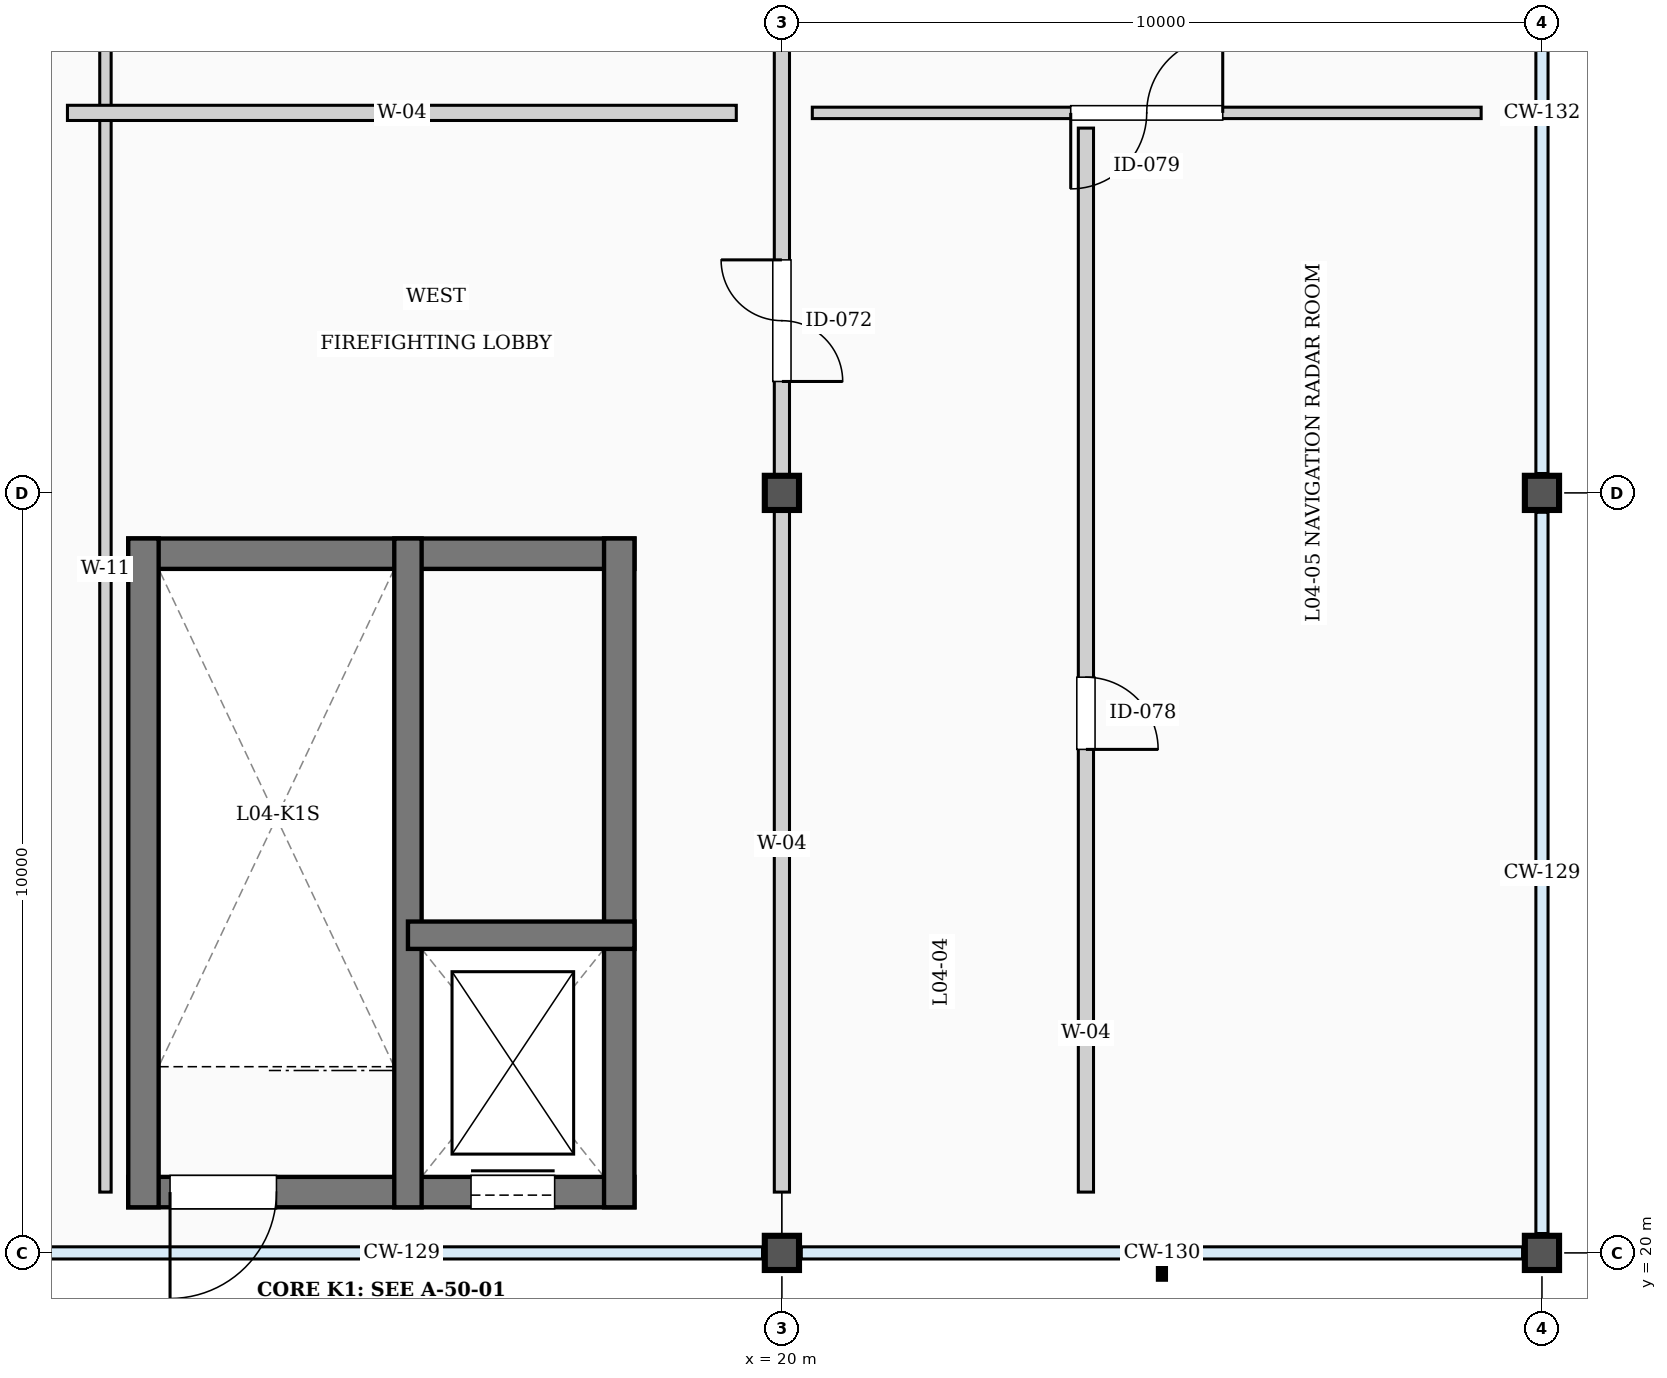
"""IFC4 building model, lengths in metres.
Left out: names, types, materials, properties, quantities, classifications, styles, units other than length and angle.
Written with IfcOpenShell. Run it as: python <this file> out.ifc"""

import sys

from ifc_helpers import new_model, si_unit, direction, frame, frame_2d, origin, origin_2d, place, context, subcontext, project, spatial, rectangle, extrude, element, fill, save


model = new_model("IFC4")
c1 = context("Model", 3, precision=1e-05, world=origin(), true_north=direction((0.0, 1.0)))
c2 = subcontext(c1, "Body", "Model", "MODEL_VIEW")
j1 = project(units=[si_unit("LENGTHUNIT", "METRE"), si_unit("PLANEANGLEUNIT", "RADIAN")], contexts=[c1])
p1 = place(None, origin())
s1 = spatial("IfcSite", under=j1, at=p1, CompositionType="ELEMENT")
p2 = place(p1, origin())
s2 = spatial("IfcBuilding", under=s1, at=p2, CompositionType="ELEMENT")
p3 = place(p2, frame((0.0, 0.0, 18.3)))
s3 = spatial("IfcBuildingStorey", under=s2, at=p3, CompositionType="ELEMENT", Elevation=18.3)
for number, where, z_axis, x_axis in (
    (1, (20.0, 20.0, 0.0), (0.0, 0.0, 1.0), (1.0, 0.0, 0.0)),
    (2, (20.0, 30.0, 0.0), (0.0, 0.0, 1.0), (1.0, 0.0, 0.0)),
    (3, (30.0, 20.0, 0.0), (0.0, 0.0, 1.0), (1.0, 0.0, 0.0)),
    (4, (30.0, 30.0, 0.0), (0.0, 0.0, 1.0), (1.0, 0.0, 0.0)),
):
    element("IfcColumn", number, at=place(p3, frame(where, z_axis=z_axis, x_axis=x_axis)), inside=s3, PredefinedType="COLUMN", context=c2, shape_type="SweptSolid", body=[
        extrude(rectangle(XDim=0.45, YDim=0.45, at=origin_2d()), origin(), (0.0, 0.0, 1.0), 3.9),
    ])
p4 = place(p3, frame((11.4, 20.8, 0.0), z_axis=(0.0, 0.0, 1.0), x_axis=(1.0, 0.0, 0.0)))
e5 = element("IfcWall", 5, at=p4, inside=s3, PredefinedType="SHEAR", context=c2, shape_type="SweptSolid", body=[
    extrude(rectangle(XDim=6.66, YDim=0.4, at=frame_2d((3.33, 0.0))), origin(), (0.0, 0.0, 1.0), 3.9),
])
p5 = place(p4, frame((0.55, 0.0, 0.0)))
e6 = element("IfcOpeningElement", 6, at=p5, cuts=e5, PredefinedType="OPENING", context=c2, shape_type="SweptSolid", body=[
    extrude(rectangle(XDim=1.4, YDim=2.35, at=frame_2d((0.7, 1.175))), frame((0.0, 0.21, 0.0), z_axis=(0.0, -1.0, 0.0), x_axis=(1.0, 0.0, 0.0)), (0.0, 0.0, 1.0), 0.42),
])
p6 = place(p4, frame((4.51, 0.0, 0.0)))
e7 = element("IfcOpeningElement", 7, at=p6, cuts=e5, PredefinedType="OPENING", context=c2, shape_type="SweptSolid", body=[
    extrude(rectangle(XDim=1.1, YDim=2.3, at=frame_2d((0.55, 1.15))), frame((0.0, 0.21, 0.0), z_axis=(0.0, -1.0, 0.0), x_axis=(1.0, 0.0, 0.0)), (0.0, 0.0, 1.0), 0.42),
])
p7 = place(p3, frame((11.4, 29.2, 0.0), z_axis=(0.0, 0.0, 1.0), x_axis=(1.0, 0.0, 0.0)))
e8 = element("IfcWall", 8, at=p7, inside=s3, PredefinedType="SHEAR", context=c2, shape_type="SweptSolid", body=[
    extrude(rectangle(XDim=6.66, YDim=0.4, at=frame_2d((3.33, 0.0))), origin(), (0.0, 0.0, 1.0), 3.9),
])
for number, where, z_axis, x_axis in (
    (9, (11.6, 20.6, 0.0), (0.0, 0.0, 1.0), (0.0, 1.0, 0.0)),
    (10, (17.86, 20.6, 0.0), (0.0, 0.0, 1.0), (0.0, 1.0, 0.0)),
):
    element("IfcWall", number, at=place(p3, frame(where, z_axis=z_axis, x_axis=x_axis)), inside=s3, PredefinedType="SHEAR", context=c2, shape_type="SweptSolid", body=[
        extrude(rectangle(XDim=8.8, YDim=0.4, at=frame_2d((4.4, 0.0))), origin(), (0.0, 0.0, 1.0), 3.9),
    ])
p8 = place(p3, frame((15.08, 20.6, 0.0), z_axis=(0.0, 0.0, 1.0), x_axis=(0.0, 1.0, 0.0)))
e11 = element("IfcWall", 11, at=p8, inside=s3, PredefinedType="SHEAR", context=c2, shape_type="SweptSolid", body=[
    extrude(rectangle(XDim=8.8, YDim=0.36, at=frame_2d((4.4, 0.0))), origin(), (0.0, 0.0, 1.0), 3.9),
])
p9 = place(p3, frame((15.08, 24.18, 0.0), z_axis=(0.0, 0.0, 1.0), x_axis=(1.0, 0.0, 0.0)))
e12 = element("IfcWall", 12, at=p9, inside=s3, PredefinedType="SHEAR", context=c2, shape_type="SweptSolid", body=[
    extrude(rectangle(XDim=2.98, YDim=0.36, at=frame_2d((1.49, 0.0))), origin(), (0.0, 0.0, 1.0), 3.9),
])
p10 = place(p3, frame((20.0, 20.8, 0.0), z_axis=(0.0, 0.0, 1.0), x_axis=(0.0, 1.0, 0.0)))
e13 = element("IfcWall", 13, at=p10, inside=s3, PredefinedType="PARTITIONING", context=c2, shape_type="SweptSolid", body=[
    extrude(rectangle(XDim=29.4, YDim=0.2, at=frame_2d((14.7, 0.0))), origin(), (0.0, 0.0, 1.0), 3.51),
])
p11 = place(p10, frame((10.666, 0.0, 0.0)))
e14 = element("IfcOpeningElement", 14, at=p11, cuts=e13, PredefinedType="OPENING", context=c2, shape_type="SweptSolid", body=[
    extrude(rectangle(XDim=1.6, YDim=2.4, at=frame_2d((0.8, 1.2))), frame((0.0, 0.11, 0.0), z_axis=(0.0, -1.0, 0.0), x_axis=(1.0, 0.0, 0.0)), (0.0, 0.0, 1.0), 0.22),
])
p12 = place(p10, frame((15.939, 0.0, 0.0)))
e15 = element("IfcOpeningElement", 15, at=p12, cuts=e13, PredefinedType="OPENING", context=c2, shape_type="SweptSolid", body=[
    extrude(rectangle(XDim=1.05, YDim=2.45, at=frame_2d((0.525, 1.225))), frame((0.0, 0.11, 0.0), z_axis=(0.0, -1.0, 0.0), x_axis=(1.0, 0.0, 0.0)), (0.0, 0.0, 1.0), 0.22),
])
p13 = place(p3, frame((11.1, 20.8, 0.0), z_axis=(0.0, 0.0, 1.0), x_axis=(0.0, 1.0, 0.0)))
e16 = element("IfcWall", 16, at=p13, inside=s3, PredefinedType="PARTITIONING", context=c2, shape_type="SweptSolid", body=[
    extrude(rectangle(XDim=38.4, YDim=0.15, at=frame_2d((19.2, 0.0))), origin(), (0.0, 0.0, 1.0), 3.56),
])
p14 = place(p13, frame((16.321, 0.0, 0.0)))
e17 = element("IfcOpeningElement", 17, at=p14, cuts=e16, PredefinedType="OPENING", context=c2, shape_type="SweptSolid", body=[
    extrude(rectangle(XDim=1.15, YDim=2.35, at=frame_2d((0.575, 1.175))), frame((0.0, 0.085, 0.0), z_axis=(0.0, -1.0, 0.0), x_axis=(1.0, 0.0, 0.0)), (0.0, 0.0, 1.0), 0.17),
])
p15 = place(p13, frame((25.746, 0.0, 0.0)))
e18 = element("IfcOpeningElement", 18, at=p15, cuts=e16, PredefinedType="OPENING", context=c2, shape_type="SweptSolid", body=[
    extrude(rectangle(XDim=1.5, YDim=2.5, at=frame_2d((0.75, 1.25))), frame((0.0, 0.085, 0.0), z_axis=(0.0, -1.0, 0.0), x_axis=(1.0, 0.0, 0.0)), (0.0, 0.0, 1.0), 0.17),
])
p16 = place(p3, frame((10.6, 35.0, 0.0), z_axis=(0.0, 0.0, 1.0), x_axis=(1.0, 0.0, 0.0)))
e19 = element("IfcWall", 19, at=p16, inside=s3, PredefinedType="PARTITIONING", context=c2, shape_type="SweptSolid", body=[
    extrude(rectangle(XDim=8.8, YDim=0.2, at=frame_2d((4.4, 0.0))), origin(), (0.0, 0.0, 1.0), 3.56),
])
p17 = place(p3, frame((24.0, 20.8, 0.0), z_axis=(0.0, 0.0, 1.0), x_axis=(0.0, 1.0, 0.0)))
e20 = element("IfcWall", 20, at=p17, inside=s3, PredefinedType="PARTITIONING", context=c2, shape_type="SweptSolid", body=[
    extrude(rectangle(XDim=14.0, YDim=0.2, at=frame_2d((7.0, 0.0))), origin(), (0.0, 0.0, 1.0), 3.56),
])
p18 = place(p17, frame((5.825, 0.0, 0.0)))
e21 = element("IfcOpeningElement", 21, at=p18, cuts=e20, PredefinedType="OPENING", context=c2, shape_type="SweptSolid", body=[
    extrude(rectangle(XDim=0.95, YDim=2.3, at=frame_2d((0.475, 1.15))), frame((0.0, 0.11, 0.0), z_axis=(0.0, -1.0, 0.0), x_axis=(1.0, 0.0, 0.0)), (0.0, 0.0, 1.0), 0.22),
])
p19 = place(p3, frame((20.4, 35.0, 0.0), z_axis=(0.0, 0.0, 1.0), x_axis=(1.0, 0.0, 0.0)))
e22 = element("IfcWall", 22, at=p19, inside=s3, PredefinedType="PARTITIONING", context=c2, shape_type="SweptSolid", body=[
    extrude(rectangle(XDim=8.8, YDim=0.15, at=frame_2d((4.4, 0.0))), origin(), (0.0, 0.0, 1.0), 3.56),
])
p20 = place(p19, frame((3.4, 0.0, 0.0)))
e23 = element("IfcOpeningElement", 23, at=p20, cuts=e22, PredefinedType="OPENING", context=c2, shape_type="SweptSolid", body=[
    extrude(rectangle(XDim=2.0, YDim=2.45, at=frame_2d((1.0, 1.225))), frame((0.0, 0.085, 0.0), z_axis=(0.0, -1.0, 0.0), x_axis=(1.0, 0.0, 0.0)), (0.0, 0.0, 1.0), 0.17),
])
p21 = place(p5, origin())
e24 = element("IfcDoor", 24, at=p21, inside=s3, OperationType="SINGLE_SWING_LEFT", PredefinedType="DOOR", context=c2, shape_type="SweptSolid", body=[
    extrude(rectangle(XDim=1.4, YDim=2.35, at=frame_2d((0.7, 1.175))), frame((0.0, 0.025, 0.0), z_axis=(0.0, -1.0, 0.0), x_axis=(1.0, 0.0, 0.0)), (0.0, 0.0, 1.0), 0.05),
])
fill(e6, e24)
p22 = place(p6, origin())
e25 = element("IfcDoor", 25, at=p22, inside=s3, OperationType="SLIDING_TO_LEFT", PredefinedType="DOOR", context=c2, shape_type="SweptSolid", body=[
    extrude(rectangle(XDim=1.1, YDim=2.3, at=frame_2d((0.55, 1.15))), frame((0.0, 0.025, 0.0), z_axis=(0.0, -1.0, 0.0), x_axis=(1.0, 0.0, 0.0)), (0.0, 0.0, 1.0), 0.05),
])
fill(e7, e25)
p23 = place(p11, origin())
e26 = element("IfcDoor", 26, at=p23, inside=s3, OperationType="DOUBLE_DOOR_SINGLE_SWING", PredefinedType="DOOR", context=c2, shape_type="SweptSolid", body=[
    extrude(rectangle(XDim=1.6, YDim=2.4, at=frame_2d((0.8, 1.2))), frame((0.0, 0.025, 0.0), z_axis=(0.0, -1.0, 0.0), x_axis=(1.0, 0.0, 0.0)), (0.0, 0.0, 1.0), 0.05),
])
fill(e14, e26)
p24 = place(p18, origin())
e27 = element("IfcDoor", 27, at=p24, inside=s3, OperationType="SINGLE_SWING_LEFT", PredefinedType="DOOR", context=c2, shape_type="SweptSolid", body=[
    extrude(rectangle(XDim=0.95, YDim=2.3, at=frame_2d((0.475, 1.15))), frame((0.0, 0.025, 0.0), z_axis=(0.0, -1.0, 0.0), x_axis=(1.0, 0.0, 0.0)), (0.0, 0.0, 1.0), 0.05),
])
fill(e21, e27)
p25 = place(p20, origin())
e28 = element("IfcDoor", 28, at=p25, inside=s3, OperationType="DOUBLE_DOOR_SINGLE_SWING", PredefinedType="DOOR", context=c2, shape_type="SweptSolid", body=[
    extrude(rectangle(XDim=2.0, YDim=2.45, at=frame_2d((1.0, 1.225))), frame((0.0, 0.025, 0.0), z_axis=(0.0, -1.0, 0.0), x_axis=(1.0, 0.0, 0.0)), (0.0, 0.0, 1.0), 0.05),
])
fill(e23, e28)
save(model, sys.argv[1])
